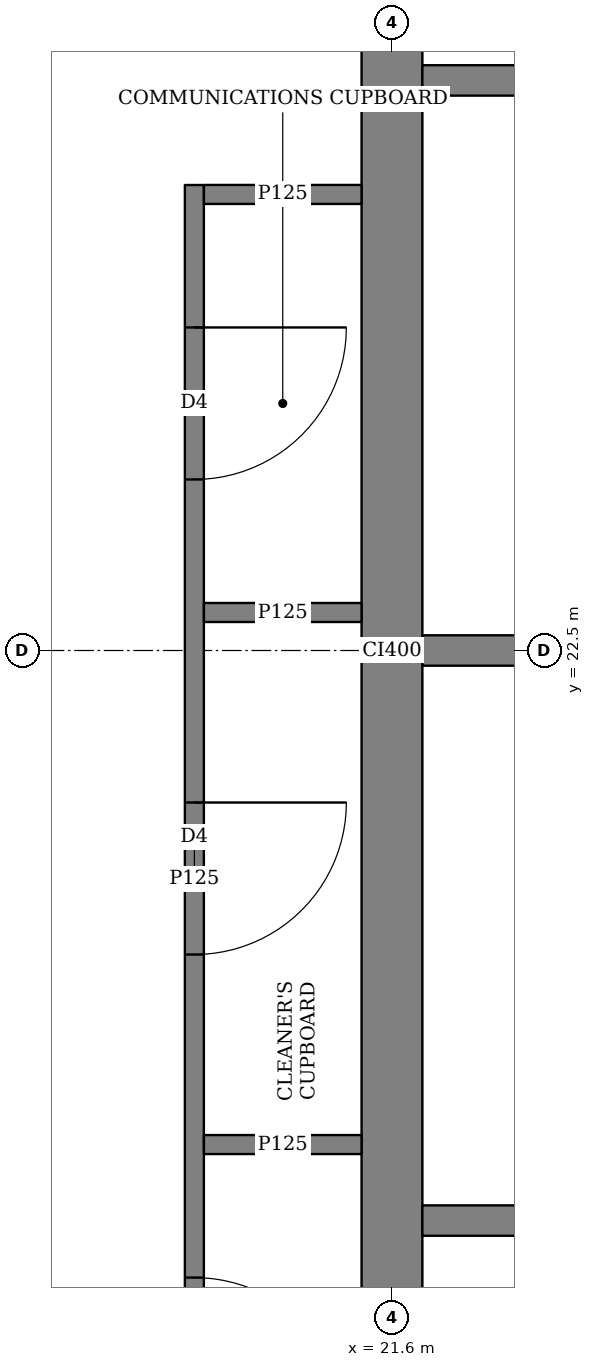
"""IFC4 building model, lengths in metres.
Left out: names, types, materials, properties, quantities, classifications, styles, units other than length and angle.
Written with IfcOpenShell. Run it as: python <this file> out.ifc"""

import sys

from ifc_helpers import new_model, si_unit, direction, frame, frame_2d, origin, place, context, subcontext, project, spatial, rectangle, extrude, element, fill, save


model = new_model("IFC4")
c1 = context("Model", 3, precision=1e-05, world=origin(), true_north=direction((0.0, 1.0)))
c2 = subcontext(c1, "Body", "Model", "MODEL_VIEW")
j1 = project(units=[si_unit("LENGTHUNIT", "METRE"), si_unit("PLANEANGLEUNIT", "RADIAN")], contexts=[c1])
p1 = place(None, origin())
s1 = spatial("IfcSite", under=j1, at=p1, CompositionType="ELEMENT")
p2 = place(p1, origin())
s2 = spatial("IfcBuilding", under=s1, at=p2, CompositionType="ELEMENT")
p3 = place(p2, frame((0.0, 0.0, 100.4)))
s3 = spatial("IfcBuildingStorey", under=s2, at=p3, CompositionType="ELEMENT", Elevation=100.4)
p4 = place(p3, frame((21.6, 15.45, 0.0), z_axis=(0.0, 0.0, 1.0), x_axis=(0.0, 1.0, 0.0)))
e1 = element("IfcWall", 1, at=p4, inside=s3, PredefinedType="SHEAR", context=c2, shape_type="SweptSolid", body=[
    extrude(rectangle(XDim=14.1, YDim=0.4, at=frame_2d((7.05, 0.0))), origin(), (0.0, 0.0, 1.0), 3.75),
])
p5 = place(p3, frame((20.3, 16.438, 0.0), z_axis=(0.0, 0.0, 1.0), x_axis=(0.0, 1.0, 0.0)))
e2 = element("IfcWall", 2, at=p5, inside=s3, PredefinedType="PARTITIONING", context=c2, shape_type="SweptSolid", body=[
    extrude(rectangle(XDim=9.124, YDim=0.125, at=frame_2d((4.562, 0.0))), origin(), (0.0, 0.0, 1.0), 3.5),
])
p6 = place(p5, frame((0.937, 0.0, 0.0)))
e3 = element("IfcOpeningElement", 3, at=p6, cuts=e2, PredefinedType="OPENING", context=c2, shape_type="SweptSolid", body=[
    extrude(rectangle(XDim=1.0, YDim=2.1, at=frame_2d((0.5, 1.05))), frame((0.0, 0.073, 0.0), z_axis=(0.0, -1.0, 0.0), x_axis=(1.0, 0.0, 0.0)), (0.0, 0.0, 1.0), 0.145),
])
p7 = place(p5, frame((4.062, 0.0, 0.0)))
e4 = element("IfcOpeningElement", 4, at=p7, cuts=e2, PredefinedType="OPENING", context=c2, shape_type="SweptSolid", body=[
    extrude(rectangle(XDim=1.0, YDim=2.1, at=frame_2d((0.5, 1.05))), frame((0.0, 0.073, 0.0), z_axis=(0.0, -1.0, 0.0), x_axis=(1.0, 0.0, 0.0)), (0.0, 0.0, 1.0), 0.145),
])
p8 = place(p5, frame((7.187, 0.0, 0.0)))
e5 = element("IfcOpeningElement", 5, at=p8, cuts=e2, PredefinedType="OPENING", context=c2, shape_type="SweptSolid", body=[
    extrude(rectangle(XDim=1.0, YDim=2.1, at=frame_2d((0.5, 1.05))), frame((0.0, 0.073, 0.0), z_axis=(0.0, -1.0, 0.0), x_axis=(1.0, 0.0, 0.0)), (0.0, 0.0, 1.0), 0.145),
])
for number, where, z_axis, x_axis in (
    (6, (20.363, 25.5, 0.0), (0.0, 0.0, 1.0), (1.0, 0.0, 0.0)),
    (7, (20.363, 19.25, 0.0), (0.0, 0.0, 1.0), (1.0, 0.0, 0.0)),
    (8, (20.363, 22.75, 0.0), (0.0, 0.0, 1.0), (1.0, 0.0, 0.0)),
):
    element("IfcWall", number, at=place(p3, frame(where, z_axis=z_axis, x_axis=x_axis)), inside=s3, PredefinedType="PARTITIONING", context=c2, shape_type="SweptSolid", body=[
        extrude(rectangle(XDim=1.037, YDim=0.125, at=frame_2d((0.519, 0.0))), origin(), (0.0, 0.0, 1.0), 3.5),
    ])
for number, where, z_axis, x_axis in (
    (9, (21.8, 18.75, 0.0), (0.0, 0.0, 1.0), (1.0, 0.0, 0.0)),
    (10, (21.8, 22.5, 0.0), (0.0, 0.0, 1.0), (1.0, 0.0, 0.0)),
    (11, (21.8, 26.25, 0.0), (0.0, 0.0, 1.0), (1.0, 0.0, 0.0)),
):
    element("IfcWall", number, at=place(p3, frame(where, z_axis=z_axis, x_axis=x_axis)), inside=s3, PredefinedType="SOLIDWALL", context=c2, shape_type="SweptSolid", body=[
        extrude(rectangle(XDim=2.2, YDim=0.2, at=frame_2d((1.1, 0.0))), origin(), (0.0, 0.0, 1.0), 3.5),
    ])
p9 = place(p6, origin())
e12 = element("IfcDoor", 12, at=p9, inside=s3, OperationType="SINGLE_SWING_RIGHT", PredefinedType="DOOR", context=c2, shape_type="SweptSolid", body=[
    extrude(rectangle(XDim=1.0, YDim=2.1, at=frame_2d((0.5, 1.05))), frame((0.0, 0.025, 0.0), z_axis=(0.0, -1.0, 0.0), x_axis=(1.0, 0.0, 0.0)), (0.0, 0.0, 1.0), 0.05),
])
fill(e3, e12)
p10 = place(p7, origin())
e13 = element("IfcDoor", 13, at=p10, inside=s3, OperationType="SINGLE_SWING_LEFT", PredefinedType="DOOR", context=c2, shape_type="SweptSolid", body=[
    extrude(rectangle(XDim=1.0, YDim=2.1, at=frame_2d((0.5, 1.05))), frame((0.0, 0.025, 0.0), z_axis=(0.0, -1.0, 0.0), x_axis=(1.0, 0.0, 0.0)), (0.0, 0.0, 1.0), 0.05),
])
fill(e4, e13)
p11 = place(p8, origin())
e14 = element("IfcDoor", 14, at=p11, inside=s3, OperationType="SINGLE_SWING_LEFT", PredefinedType="DOOR", context=c2, shape_type="SweptSolid", body=[
    extrude(rectangle(XDim=1.0, YDim=2.1, at=frame_2d((0.5, 1.05))), frame((0.0, 0.025, 0.0), z_axis=(0.0, -1.0, 0.0), x_axis=(1.0, 0.0, 0.0)), (0.0, 0.0, 1.0), 0.05),
])
fill(e5, e14)
save(model, sys.argv[1])
